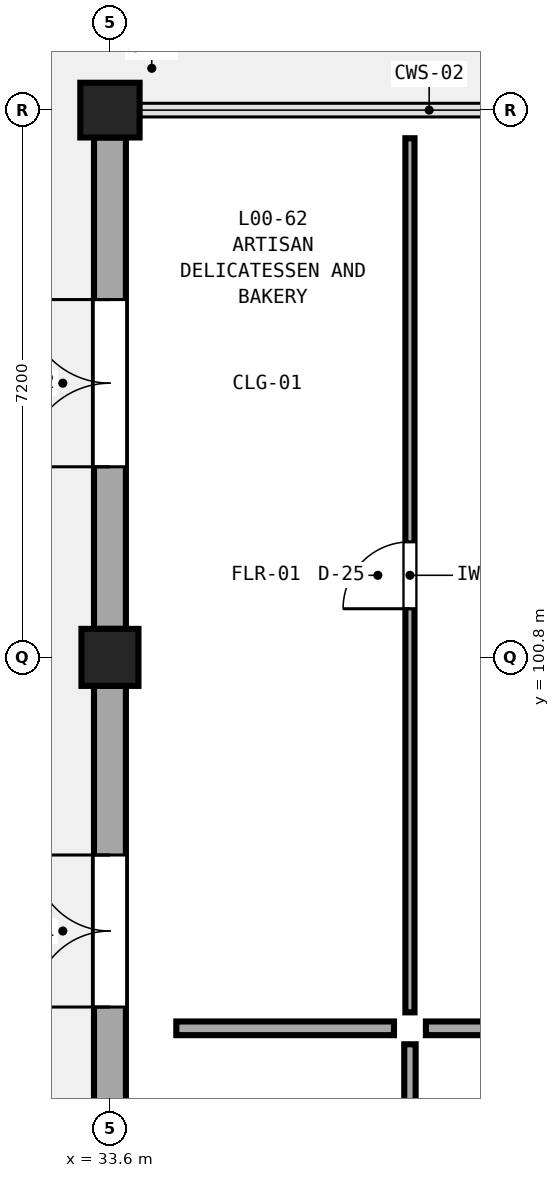
"""IFC4 building model, lengths in metres.
Left out: names, types, materials, properties, quantities, classifications, styles, units other than length and angle.
Written with IfcOpenShell. Run it as: python <this file> out.ifc"""

import sys

from ifc_helpers import new_model, si_unit, direction, frame, frame_2d, origin, origin_2d, place, context, subcontext, project, spatial, rectangle, extrude, element, fill, save


model = new_model("IFC4")
c1 = context("Model", 3, precision=1e-05, world=origin(), true_north=direction((0.0, 1.0)))
c2 = subcontext(c1, "Body", "Model", "MODEL_VIEW")
j1 = project(units=[si_unit("LENGTHUNIT", "METRE"), si_unit("PLANEANGLEUNIT", "RADIAN")], contexts=[c1])
p1 = place(None, origin())
s1 = spatial("IfcSite", under=j1, at=p1, CompositionType="ELEMENT")
p2 = place(p1, origin())
s2 = spatial("IfcBuilding", under=s1, at=p2, CompositionType="ELEMENT")
p3 = place(p2, origin())
s3 = spatial("IfcBuildingStorey", under=s2, at=p3, CompositionType="ELEMENT", Elevation=0.0)
p4 = place(p3, frame((33.6, 100.8, 0.0), z_axis=(0.0, 0.0, 1.0), x_axis=(1.0, 0.0, 0.0)))
e1 = element("IfcColumn", 1, at=p4, inside=s3, PredefinedType="COLUMN", context=c2, shape_type="SweptSolid", body=[
    extrude(rectangle(XDim=0.75, YDim=0.75, at=origin_2d()), origin(), (0.0, 0.0, 1.0), 5.4),
])
p5 = place(p3, frame((33.6, 108.0, 0.0), z_axis=(0.0, 0.0, 1.0), x_axis=(1.0, 0.0, 0.0)))
e2 = element("IfcColumn", 2, at=p5, inside=s3, PredefinedType="PILASTER", context=c2, shape_type="SweptSolid", body=[
    extrude(rectangle(XDim=0.78, YDim=0.72, at=origin_2d()), origin(), (0.0, 0.0, 1.0), 5.4),
])
p6 = place(p3, frame((33.6, 93.975, 0.0), z_axis=(0.0, 0.0, 1.0), x_axis=(0.0, 1.0, 0.0)))
e3 = element("IfcWall", 3, at=p6, inside=s3, PredefinedType="SOLIDWALL", context=c2, shape_type="SweptSolid", body=[
    extrude(rectangle(XDim=6.45, YDim=0.42, at=frame_2d((3.225, 0.0))), origin(), (0.0, 0.0, 1.0), 4.53),
])
p7 = place(p6, frame((2.225, 0.0, 0.0)))
e4 = element("IfcOpeningElement", 4, at=p7, cuts=e3, PredefinedType="OPENING", context=c2, shape_type="SweptSolid", body=[
    extrude(rectangle(XDim=2.0, YDim=2.4, at=frame_2d((1.0, 1.2))), frame((0.0, 0.23, 0.0), z_axis=(0.0, -1.0, 0.0), x_axis=(1.0, 0.0, 0.0)), (0.0, 0.0, 1.0), 0.46),
])
p8 = place(p3, frame((33.6, 101.175, 0.0), z_axis=(0.0, 0.0, 1.0), x_axis=(0.0, 1.0, 0.0)))
e5 = element("IfcWall", 5, at=p8, inside=s3, PredefinedType="SOLIDWALL", context=c2, shape_type="SweptSolid", body=[
    extrude(rectangle(XDim=6.465, YDim=0.42, at=frame_2d((3.232, 0.0))), origin(), (0.0, 0.0, 1.0), 4.53),
])
p9 = place(p8, frame((2.133, 0.0, 0.0)))
e6 = element("IfcOpeningElement", 6, at=p9, cuts=e5, PredefinedType="OPENING", context=c2, shape_type="SweptSolid", body=[
    extrude(rectangle(XDim=2.2, YDim=2.5, at=frame_2d((1.1, 1.25))), frame((0.0, 0.23, 0.0), z_axis=(0.0, -1.0, 0.0), x_axis=(1.0, 0.0, 0.0)), (0.0, 0.0, 1.0), 0.46),
])
p10 = place(p3, frame((37.757, 95.92, 0.0), z_axis=(0.0, 0.0, 1.0), x_axis=(1.0, 0.0, 0.0)))
e7 = element("IfcWall", 7, at=p10, inside=s3, PredefinedType="PARTITIONING", context=c2, shape_type="SweptSolid", body=[
    extrude(rectangle(XDim=18.193, YDim=0.18, at=frame_2d((9.096, 0.0))), origin(), (0.0, 0.0, 1.0), 5.08),
])
p11 = place(p3, frame((37.547, 96.13, 0.0), z_axis=(0.0, 0.0, 1.0), x_axis=(0.0, 1.0, 0.0)))
e8 = element("IfcWall", 8, at=p11, inside=s3, PredefinedType="PARTITIONING", context=c2, shape_type="SweptSolid", body=[
    extrude(rectangle(XDim=11.5, YDim=0.12, at=frame_2d((5.75, 0.0))), origin(), (0.0, 0.0, 1.0), 5.08),
])
p12 = place(p11, frame((5.31, 0.0, 0.0)))
e9 = element("IfcOpeningElement", 9, at=p12, cuts=e8, PredefinedType="OPENING", context=c2, shape_type="SweptSolid", body=[
    extrude(rectangle(XDim=0.88, YDim=2.37, at=frame_2d((0.44, 1.185))), frame((0.0, 0.08, 0.0), z_axis=(0.0, -1.0, 0.0), x_axis=(1.0, 0.0, 0.0)), (0.0, 0.0, 1.0), 0.16),
])
p13 = place(p3, frame((37.547, 85.09, 0.0), z_axis=(0.0, 0.0, 1.0), x_axis=(0.0, 1.0, 0.0)))
e10 = element("IfcWall", 10, at=p13, inside=s3, PredefinedType="PARTITIONING", context=c2, shape_type="SweptSolid", body=[
    extrude(rectangle(XDim=10.62, YDim=0.15, at=frame_2d((5.31, 0.0))), origin(), (0.0, 0.0, 1.0), 5.08),
])
p14 = place(p3, frame((34.473, 95.92, 0.0), z_axis=(0.0, 0.0, 1.0), x_axis=(1.0, 0.0, 0.0)))
e11 = element("IfcWall", 11, at=p14, inside=s3, PredefinedType="PARTITIONING", context=c2, shape_type="SweptSolid", body=[
    extrude(rectangle(XDim=2.864, YDim=0.18, at=frame_2d((1.432, 0.0))), origin(), (0.0, 0.0, 1.0), 5.08),
])
p15 = place(p7, origin())
e12 = element("IfcDoor", 12, at=p15, inside=s3, OperationType="DOUBLE_DOOR_SINGLE_SWING", PredefinedType="DOOR", context=c2, shape_type="SweptSolid", body=[
    extrude(rectangle(XDim=2.0, YDim=2.4, at=frame_2d((1.0, 1.2))), frame((0.0, 0.025, 0.0), z_axis=(0.0, -1.0, 0.0), x_axis=(1.0, 0.0, 0.0)), (0.0, 0.0, 1.0), 0.05),
])
fill(e4, e12)
p16 = place(p9, origin())
e13 = element("IfcDoor", 13, at=p16, inside=s3, OperationType="DOUBLE_DOOR_SINGLE_SWING", PredefinedType="DOOR", context=c2, shape_type="SweptSolid", body=[
    extrude(rectangle(XDim=2.2, YDim=2.5, at=frame_2d((1.1, 1.25))), frame((0.0, 0.025, 0.0), z_axis=(0.0, -1.0, 0.0), x_axis=(1.0, 0.0, 0.0)), (0.0, 0.0, 1.0), 0.05),
])
fill(e6, e13)
p17 = place(p12, origin())
e14 = element("IfcDoor", 14, at=p17, inside=s3, OperationType="SINGLE_SWING_LEFT", PredefinedType="DOOR", context=c2, shape_type="SweptSolid", body=[
    extrude(rectangle(XDim=0.88, YDim=2.37, at=frame_2d((0.44, 1.185))), frame((0.0, 0.025, 0.0), z_axis=(0.0, -1.0, 0.0), x_axis=(1.0, 0.0, 0.0)), (0.0, 0.0, 1.0), 0.05),
])
fill(e9, e14)
save(model, sys.argv[1])
